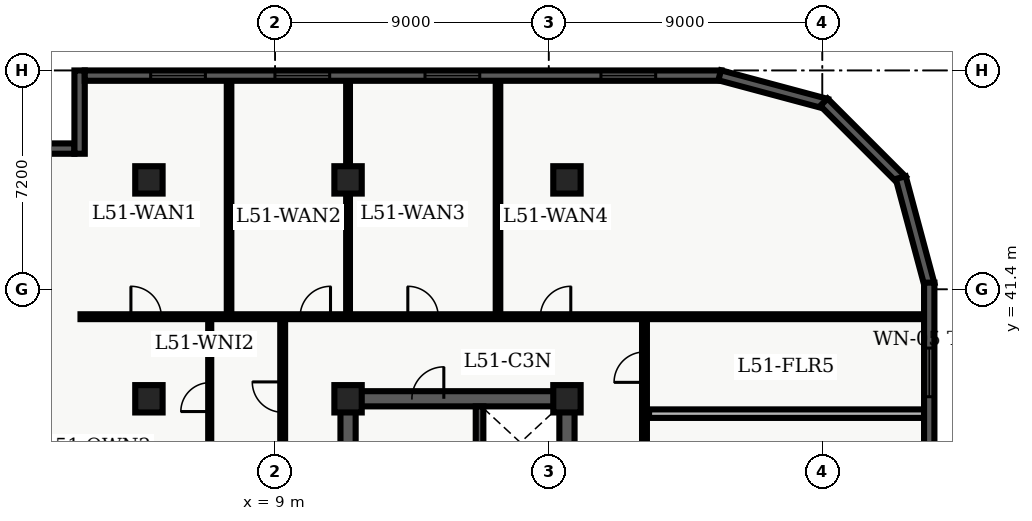
"""IFC4 building model, lengths in metres.
Left out: names, types, materials, properties, quantities, classifications, styles, units other than length and angle.
Written with IfcOpenShell. Run it as: python <this file> out.ifc"""

import sys

from ifc_helpers import new_model, entity, si_unit, converted_unit, direction, frame, origin_with_axes, origin_2d_with_axis, place, context, subcontext, project, spatial, polyline, rectangle, outline, extrude, element, fill, save


model = new_model("IFC4")
c1 = context("Model", 3, precision=1e-05, world=origin_with_axes(), true_north=direction((0.0, 1.0)))
c2 = subcontext(c1, "Body", "Model", "MODEL_VIEW")
j1 = project(units=[si_unit("LENGTHUNIT", "METRE"), converted_unit("PLANEANGLEUNIT", "DEGREE", entity("IfcPlaneAngleMeasure", 0.017), si_unit("PLANEANGLEUNIT", "RADIAN"), dimensions=[0, 0, 0, 0, 0, 0, 0])], contexts=[c1])
p1 = place(None, origin_with_axes())
s1 = spatial("IfcSite", under=j1, at=p1, CompositionType="ELEMENT")
p2 = place(p1, origin_with_axes())
s2 = spatial("IfcBuilding", under=s1, at=p2, CompositionType="ELEMENT")
p3 = place(p2, frame((0.0, 0.0, 208.2), z_axis=(0.0, 0.0, 1.0), x_axis=(1.0, 0.0, 0.0)))
s3 = spatial("IfcBuildingStorey", under=s2, at=p3, CompositionType="ELEMENT", Elevation=208.2)
p4 = place(p3, frame((11.4, 10.8, 0.0), z_axis=(0.0, 0.0, 1.0), x_axis=(0.0, 1.0, 0.0)))
e1 = element("IfcWall", 1, at=p4, inside=s3, PredefinedType="SHEAR", context=c2, shape_type="SweptSolid", body=[
    extrude(outline(polyline([(0.0, -0.25), (27.0, -0.25), (27.0, 0.25), (0.0, 0.25), (0.0, -0.25)])), origin_with_axes(), (0.0, 0.0, 1.0), 3.66),
])
p5 = place(p3, frame((11.4, 37.8, 0.0), z_axis=(0.0, 0.0, 1.0), x_axis=(1.0, 0.0, 0.0)))
e2 = element("IfcWall", 2, at=p5, inside=s3, PredefinedType="SHEAR", context=c2, shape_type="SweptSolid", body=[
    extrude(outline(polyline([(0.0, -0.25), (7.2, -0.25), (7.2, 0.25), (0.0, 0.25), (0.0, -0.25)])), origin_with_axes(), (0.0, 0.0, 1.0), 3.66),
])
p6 = place(p5, frame((2.625, 0.0, 0.0), z_axis=(0.0, 0.0, 1.0), x_axis=(1.0, 0.0, 0.0)))
e3 = element("IfcOpeningElement", 3, at=p6, cuts=e2, PredefinedType="OPENING", context=c2, shape_type="SweptSolid", body=[
    extrude(rectangle(XDim=1.05, YDim=0.52, at=origin_2d_with_axis()), origin_with_axes(), (0.0, 0.0, 1.0), 2.15),
])
p7 = place(p3, frame((18.6, 24.3, 0.0), z_axis=(0.0, 0.0, 1.0), x_axis=(0.0, 1.0, 0.0)))
e4 = element("IfcWall", 4, at=p7, inside=s3, PredefinedType="SHEAR", context=c2, shape_type="SweptSolid", body=[
    extrude(outline(polyline([(0.0, -0.25), (13.5, -0.25), (13.5, 0.25), (0.0, 0.25), (0.0, -0.25)])), origin_with_axes(), (0.0, 0.0, 1.0), 3.66),
])
p8 = place(p7, frame((5.65, 0.0, 0.0), z_axis=(0.0, 0.0, 1.0), x_axis=(1.0, 0.0, 0.0)))
e5 = element("IfcOpeningElement", 5, at=p8, cuts=e4, PredefinedType="OPENING", context=c2, shape_type="SweptSolid", body=[
    extrude(rectangle(XDim=1.1, YDim=0.52, at=origin_2d_with_axis()), origin_with_axes(), (0.0, 0.0, 1.0), 2.15),
])
p9 = place(p7, frame((7.75, 0.0, 0.0), z_axis=(0.0, 0.0, 1.0), x_axis=(1.0, 0.0, 0.0)))
e6 = element("IfcOpeningElement", 6, at=p9, cuts=e4, PredefinedType="OPENING", context=c2, shape_type="SweptSolid", body=[
    extrude(rectangle(XDim=1.1, YDim=0.52, at=origin_2d_with_axis()), origin_with_axes(), (0.0, 0.0, 1.0), 2.15),
])
p10 = place(p3, frame((15.725, 28.9, 0.0), z_axis=(0.0, 0.0, 1.0), x_axis=(0.0, 1.0, 0.0)))
e7 = element("IfcWall", 7, at=p10, inside=s3, PredefinedType="SHEAR", context=c2, shape_type="SweptSolid", body=[
    extrude(outline(polyline([(0.0, -0.125), (8.65, -0.125), (8.65, 0.125), (0.0, 0.125), (0.0, -0.125)])), origin_with_axes(), (0.0, 0.0, 1.0), 3.66),
])
for number, where, z_axis, x_axis in (
    (8, (11.4, 37.8, 0.0), (0.0, 0.0, 1.0), (1.0, 0.0, 0.0)),
    (9, (11.4, 45.0, 0.0), (0.0, 0.0, 1.0), (1.0, 0.0, 0.0)),
    (10, (18.6, 37.8, 0.0), (0.0, 0.0, 1.0), (1.0, 0.0, 0.0)),
    (11, (18.6, 45.0, 0.0), (0.0, 0.0, 1.0), (1.0, 0.0, 0.0)),
    (12, (4.85, 37.8, 0.0), (0.0, 0.0, 1.0), (1.0, 0.0, 0.0)),
    (13, (4.85, 45.0, 0.0), (0.0, 0.0, 1.0), (1.0, 0.0, 0.0)),
):
    element("IfcColumn", number, at=place(p3, frame(where, z_axis=z_axis, x_axis=x_axis)), inside=s3, PredefinedType="COLUMN", context=c2, shape_type="SweptSolid", body=[
        extrude(rectangle(XDim=0.9, YDim=0.9, at=origin_2d_with_axis()), origin_with_axes(), (0.0, 0.0, 1.0), 3.9),
    ])
p11 = place(p3, frame((2.6, 40.5, 0.0), z_axis=(0.0, 0.0, 1.0), x_axis=(1.0, 0.0, 0.0)))
e14 = element("IfcWall", 14, at=p11, inside=s3, PredefinedType="PARTITIONING", context=c2, shape_type="SweptSolid", body=[
    extrude(outline(polyline([(0.0, -0.08), (27.751, -0.08), (27.751, 0.08), (0.0, 0.08), (0.0, -0.08)])), origin_with_axes(), (0.0, 0.0, 1.0), 2.7),
])
p12 = place(p11, frame((2.158, 0.0, 0.0), z_axis=(0.0, 0.0, 1.0), x_axis=(1.0, 0.0, 0.0)))
e15 = element("IfcOpeningElement", 15, at=p12, cuts=e14, PredefinedType="OPENING", context=c2, shape_type="SweptSolid", body=[
    extrude(rectangle(XDim=1.0, YDim=0.18, at=origin_2d_with_axis()), origin_with_axes(), (0.0, 0.0, 1.0), 2.15),
])
p13 = place(p11, frame((7.723, 0.0, 0.0), z_axis=(0.0, 0.0, 1.0), x_axis=(1.0, 0.0, 0.0)))
e16 = element("IfcOpeningElement", 16, at=p13, cuts=e14, PredefinedType="OPENING", context=c2, shape_type="SweptSolid", body=[
    extrude(rectangle(XDim=1.0, YDim=0.18, at=origin_2d_with_axis()), origin_with_axes(), (0.0, 0.0, 1.0), 2.15),
])
p14 = place(p11, frame((11.266, 0.0, 0.0), z_axis=(0.0, 0.0, 1.0), x_axis=(1.0, 0.0, 0.0)))
e17 = element("IfcOpeningElement", 17, at=p14, cuts=e14, PredefinedType="OPENING", context=c2, shape_type="SweptSolid", body=[
    extrude(rectangle(XDim=1.0, YDim=0.18, at=origin_2d_with_axis()), origin_with_axes(), (0.0, 0.0, 1.0), 2.15),
])
p15 = place(p11, frame((15.626, 0.0, 0.0), z_axis=(0.0, 0.0, 1.0), x_axis=(1.0, 0.0, 0.0)))
e18 = element("IfcOpeningElement", 18, at=p15, cuts=e14, PredefinedType="OPENING", context=c2, shape_type="SweptSolid", body=[
    extrude(rectangle(XDim=1.0, YDim=0.18, at=origin_2d_with_axis()), origin_with_axes(), (0.0, 0.0, 1.0), 2.15),
])
p16 = place(p3, frame((21.15, 7.8, 0.0), z_axis=(0.0, 0.0, 1.0), x_axis=(0.0, 1.0, 0.0)))
e19 = element("IfcWall", 19, at=p16, inside=s3, PredefinedType="PARTITIONING", context=c2, shape_type="SweptSolid", body=[
    extrude(outline(polyline([(0.0, -0.08), (32.7, -0.08), (32.7, 0.08), (0.0, 0.08), (0.0, -0.08)])), origin_with_axes(), (0.0, 0.0, 1.0), 2.7),
])
p17 = place(p16, frame((15.566, 0.0, 0.0), z_axis=(0.0, 0.0, 1.0), x_axis=(1.0, 0.0, 0.0)))
e20 = element("IfcOpeningElement", 20, at=p17, cuts=e19, PredefinedType="OPENING", context=c2, shape_type="SweptSolid", body=[
    extrude(rectangle(XDim=1.0, YDim=0.18, at=origin_2d_with_axis()), origin_with_axes(), (0.0, 0.0, 1.0), 2.15),
])
p18 = place(p16, frame((19.003, 0.0, 0.0), z_axis=(0.0, 0.0, 1.0), x_axis=(1.0, 0.0, 0.0)))
e21 = element("IfcOpeningElement", 21, at=p18, cuts=e19, PredefinedType="OPENING", context=c2, shape_type="SweptSolid", body=[
    extrude(rectangle(XDim=1.0, YDim=0.18, at=origin_2d_with_axis()), origin_with_axes(), (0.0, 0.0, 1.0), 2.15),
])
p19 = place(p16, frame((22.854, 0.0, 0.0), z_axis=(0.0, 0.0, 1.0), x_axis=(1.0, 0.0, 0.0)))
e22 = element("IfcOpeningElement", 22, at=p19, cuts=e19, PredefinedType="OPENING", context=c2, shape_type="SweptSolid", body=[
    extrude(rectangle(XDim=1.0, YDim=0.18, at=origin_2d_with_axis()), origin_with_axes(), (0.0, 0.0, 1.0), 2.15),
])
p20 = place(p16, frame((27.208, 0.0, 0.0), z_axis=(0.0, 0.0, 1.0), x_axis=(1.0, 0.0, 0.0)))
e23 = element("IfcOpeningElement", 23, at=p20, cuts=e19, PredefinedType="OPENING", context=c2, shape_type="SweptSolid", body=[
    extrude(rectangle(XDim=1.0, YDim=0.18, at=origin_2d_with_axis()), origin_with_axes(), (0.0, 0.0, 1.0), 2.15),
])
p21 = place(p16, frame((31.041, 0.0, 0.0), z_axis=(0.0, 0.0, 1.0), x_axis=(1.0, 0.0, 0.0)))
e24 = element("IfcOpeningElement", 24, at=p21, cuts=e19, PredefinedType="OPENING", context=c2, shape_type="SweptSolid", body=[
    extrude(rectangle(XDim=1.0, YDim=0.18, at=origin_2d_with_axis()), origin_with_axes(), (0.0, 0.0, 1.0), 2.15),
])
p22 = place(p16, frame((5.775, 0.0, 0.0), z_axis=(0.0, 0.0, 1.0), x_axis=(1.0, 0.0, 0.0)))
e25 = element("IfcOpeningElement", 25, at=p22, cuts=e19, PredefinedType="OPENING", context=c2, shape_type="SweptSolid", body=[
    extrude(rectangle(XDim=1.05, YDim=0.18, at=origin_2d_with_axis()), origin_with_axes(), (0.0, 0.0, 1.0), 2.15),
])
p23 = place(p3, frame((9.25, 24.4, 0.0), z_axis=(0.0, 0.0, 1.0), x_axis=(0.0, 1.0, 0.0)))
e26 = element("IfcWall", 26, at=p23, inside=s3, PredefinedType="PARTITIONING", context=c2, shape_type="SweptSolid", body=[
    extrude(outline(polyline([(0.0, -0.08), (16.1, -0.08), (16.1, 0.08), (0.0, 0.08), (0.0, -0.08)])), origin_with_axes(), (0.0, 0.0, 1.0), 2.7),
])
p24 = place(p23, frame((5.51, 0.0, 0.0), z_axis=(0.0, 0.0, 1.0), x_axis=(1.0, 0.0, 0.0)))
e27 = element("IfcOpeningElement", 27, at=p24, cuts=e26, PredefinedType="OPENING", context=c2, shape_type="SweptSolid", body=[
    extrude(rectangle(XDim=1.0, YDim=0.18, at=origin_2d_with_axis()), origin_with_axes(), (0.0, 0.0, 1.0), 2.15),
])
p25 = place(p23, frame((13.455, 0.0, 0.0), z_axis=(0.0, 0.0, 1.0), x_axis=(1.0, 0.0, 0.0)))
e28 = element("IfcOpeningElement", 28, at=p25, cuts=e26, PredefinedType="OPENING", context=c2, shape_type="SweptSolid", body=[
    extrude(rectangle(XDim=1.0, YDim=0.18, at=origin_2d_with_axis()), origin_with_axes(), (0.0, 0.0, 1.0), 2.15),
])
p26 = place(p3, frame((6.85, 24.55, 0.0), z_axis=(0.0, 0.0, 1.0), x_axis=(0.0, 1.0, 0.0)))
e29 = element("IfcWall", 29, at=p26, inside=s3, PredefinedType="PARTITIONING", context=c2, shape_type="SweptSolid", body=[
    extrude(outline(polyline([(0.0, -0.05), (15.75, -0.05), (15.75, 0.05), (0.0, 0.05), (0.0, -0.05)])), origin_with_axes(), (0.0, 0.0, 1.0), 2.7),
])
p27 = place(p26, frame((5.36, 0.0, 0.0), z_axis=(0.0, 0.0, 1.0), x_axis=(1.0, 0.0, 0.0)))
e30 = element("IfcOpeningElement", 30, at=p27, cuts=e29, PredefinedType="OPENING", context=c2, shape_type="SweptSolid", body=[
    extrude(rectangle(XDim=0.95, YDim=0.12, at=origin_2d_with_axis()), origin_with_axes(), (0.0, 0.0, 1.0), 2.15),
])
p28 = place(p26, frame((13.305, 0.0, 0.0), z_axis=(0.0, 0.0, 1.0), x_axis=(1.0, 0.0, 0.0)))
e31 = element("IfcOpeningElement", 31, at=p28, cuts=e29, PredefinedType="OPENING", context=c2, shape_type="SweptSolid", body=[
    extrude(rectangle(XDim=0.95, YDim=0.12, at=origin_2d_with_axis()), origin_with_axes(), (0.0, 0.0, 1.0), 2.15),
])
p29 = place(p3, frame((7.486, 40.6, 0.0), z_axis=(0.0, 0.0, 1.0), x_axis=(0.0, 1.0, 0.0)))
e32 = element("IfcWall", 32, at=p29, inside=s3, PredefinedType="PARTITIONING", context=c2, shape_type="SweptSolid", body=[
    extrude(outline(polyline([(0.0, -0.075), (7.665, -0.075), (7.665, 0.075), (0.0, 0.075), (0.0, -0.075)])), origin_with_axes(), (0.0, 0.0, 1.0), 2.7),
])
p30 = place(p3, frame((11.4, 40.6, 0.0), z_axis=(0.0, 0.0, 1.0), x_axis=(0.0, 1.0, 0.0)))
e33 = element("IfcWall", 33, at=p30, inside=s3, PredefinedType="PARTITIONING", context=c2, shape_type="SweptSolid", body=[
    extrude(outline(polyline([(0.0, -0.062), (7.665, -0.062), (7.665, 0.062), (0.0, 0.062), (0.0, -0.062)])), origin_with_axes(), (0.0, 0.0, 1.0), 2.7),
])
p31 = place(p3, frame((16.332, 40.6, 0.0), z_axis=(0.0, 0.0, 1.0), x_axis=(0.0, 1.0, 0.0)))
e34 = element("IfcWall", 34, at=p31, inside=s3, PredefinedType="PARTITIONING", context=c2, shape_type="SweptSolid", body=[
    extrude(outline(polyline([(0.0, -0.075), (7.665, -0.075), (7.665, 0.075), (0.0, 0.075), (0.0, -0.075)])), origin_with_axes(), (0.0, 0.0, 1.0), 2.7),
])
p32 = place(p3, frame((21.3, 37.311, 0.0), z_axis=(0.0, 0.0, 1.0), x_axis=(1.0, 0.0, 0.0)))
e35 = element("IfcWall", 35, at=p32, inside=s3, PredefinedType="PARTITIONING", context=c2, shape_type="SweptSolid", body=[
    extrude(outline(polyline([(0.0, -0.14), (9.051, -0.14), (9.051, 0.14), (0.0, 0.14), (0.0, -0.14)])), origin_with_axes(), (0.0, 0.0, 1.0), 2.7),
])
p33 = place(p3, frame((0.34, 46.03, 0.0), z_axis=(0.0, 0.0, 1.0), x_axis=(1.0, 0.0, 0.0)))
e36 = element("IfcWall", 36, at=p33, inside=s3, PredefinedType="SOLIDWALL", context=c2, shape_type="SweptSolid", body=[
    extrude(outline(polyline([(0.0, -0.17), (2.06, -0.17), (2.06, 0.17), (0.0, 0.17), (0.0, -0.17)])), origin_with_axes(), (0.0, 0.0, 1.0), 3.66),
])
p34 = place(p3, frame((2.57, 45.86, 0.0), z_axis=(0.0, 0.0, 1.0), x_axis=(0.0, 1.0, 0.0)))
e37 = element("IfcWall", 37, at=p34, inside=s3, PredefinedType="SOLIDWALL", context=c2, shape_type="SweptSolid", body=[
    extrude(outline(polyline([(0.0, -0.17), (2.74, -0.17), (2.74, 0.17), (0.0, 0.17), (0.0, -0.17)])), origin_with_axes(), (0.0, 0.0, 1.0), 3.66),
])
p35 = place(p3, frame((2.74, 48.43, 0.0), z_axis=(0.0, 0.0, 1.0), x_axis=(1.0, 0.0, 0.0)))
e38 = element("IfcWall", 38, at=p35, inside=s3, PredefinedType="SOLIDWALL", context=c2, shape_type="SweptSolid", body=[
    extrude(outline(polyline([(0.0, -0.17), (20.946, -0.17), (20.946, 0.17), (0.0, 0.17), (0.0, -0.17)])), origin_with_axes(), (0.0, 0.0, 1.0), 3.66),
])
p36 = place(p35, frame((3.068, 0.0, 0.45), z_axis=(0.0, 0.0, 1.0), x_axis=(1.0, 0.0, 0.0)))
e39 = element("IfcOpeningElement", 39, at=p36, cuts=e38, PredefinedType="OPENING", context=c2, shape_type="SweptSolid", body=[
    extrude(rectangle(XDim=1.8, YDim=0.36, at=origin_2d_with_axis()), origin_with_axes(), (0.0, 0.0, 1.0), 2.1),
])
p37 = place(p35, frame((7.155, 0.0, 0.45), z_axis=(0.0, 0.0, 1.0), x_axis=(1.0, 0.0, 0.0)))
e40 = element("IfcOpeningElement", 40, at=p37, cuts=e38, PredefinedType="OPENING", context=c2, shape_type="SweptSolid", body=[
    extrude(rectangle(XDim=1.8, YDim=0.36, at=origin_2d_with_axis()), origin_with_axes(), (0.0, 0.0, 1.0), 2.1),
])
p38 = place(p35, frame((12.091, 0.0, 0.45), z_axis=(0.0, 0.0, 1.0), x_axis=(1.0, 0.0, 0.0)))
e41 = element("IfcOpeningElement", 41, at=p38, cuts=e38, PredefinedType="OPENING", context=c2, shape_type="SweptSolid", body=[
    extrude(rectangle(XDim=1.8, YDim=0.36, at=origin_2d_with_axis()), origin_with_axes(), (0.0, 0.0, 1.0), 2.1),
])
p39 = place(p35, frame((17.878, 0.0, 0.45), z_axis=(0.0, 0.0, 1.0), x_axis=(1.0, 0.0, 0.0)))
e42 = element("IfcOpeningElement", 42, at=p39, cuts=e38, PredefinedType="OPENING", context=c2, shape_type="SweptSolid", body=[
    extrude(rectangle(XDim=1.8, YDim=0.36, at=origin_2d_with_axis()), origin_with_axes(), (0.0, 0.0, 1.0), 2.1),
])
p40 = place(p3, frame((23.623, 48.441, 0.0), z_axis=(0.0, 0.0, 1.0), x_axis=(0.96592, -0.258841, 0.0)))
e43 = element("IfcWall", 43, at=p40, inside=s3, PredefinedType="SOLIDWALL", context=c2, shape_type="SweptSolid", body=[
    extrude(outline(polyline([(0.0, -0.17), (3.643, -0.17), (3.643, 0.17), (0.0, 0.17), (0.0, -0.17)])), origin_with_axes(), (0.0, 0.0, 1.0), 3.66),
])
p41 = place(p3, frame((27.052, 47.556, 0.0), z_axis=(0.0, 0.0, 1.0), x_axis=(0.707107, -0.707107, 0.0)))
e44 = element("IfcWall", 44, at=p41, inside=s3, PredefinedType="SOLIDWALL", context=c2, shape_type="SweptSolid", body=[
    extrude(outline(polyline([(0.0, -0.17), (3.643, -0.17), (3.643, 0.17), (0.0, 0.17), (0.0, -0.17)])), origin_with_axes(), (0.0, 0.0, 1.0), 3.66),
])
p42 = place(p3, frame((29.579, 45.075, 0.0), z_axis=(0.0, 0.0, 1.0), x_axis=(0.258841, -0.96592, 0.0)))
e45 = element("IfcWall", 45, at=p42, inside=s3, PredefinedType="SOLIDWALL", context=c2, shape_type="SweptSolid", body=[
    extrude(outline(polyline([(0.0, -0.17), (3.643, -0.17), (3.643, 0.17), (0.0, 0.17), (0.0, -0.17)])), origin_with_axes(), (0.0, 0.0, 1.0), 3.66),
])
p43 = place(p3, frame((30.516, 41.62, 0.0), z_axis=(0.0, 0.0, 1.0), x_axis=(0.0, -1.0, 0.0)))
e46 = element("IfcWall", 46, at=p43, inside=s3, PredefinedType="SOLIDWALL", context=c2, shape_type="SweptSolid", body=[
    extrude(outline(polyline([(0.0, -0.17), (20.02, -0.17), (20.02, 0.17), (0.0, 0.17), (0.0, -0.17)])), origin_with_axes(), (0.0, 0.0, 1.0), 3.66),
])
p44 = place(p43, frame((2.952, 0.0, 0.45), z_axis=(0.0, 0.0, 1.0), x_axis=(1.0, 0.0, 0.0)))
e47 = element("IfcOpeningElement", 47, at=p44, cuts=e46, PredefinedType="OPENING", context=c2, shape_type="SweptSolid", body=[
    extrude(rectangle(XDim=1.6, YDim=0.36, at=origin_2d_with_axis()), origin_with_axes(), (0.0, 0.0, 1.0), 2.2),
])
p45 = place(p43, frame((7.207, 0.0, 0.45), z_axis=(0.0, 0.0, 1.0), x_axis=(1.0, 0.0, 0.0)))
e48 = element("IfcOpeningElement", 48, at=p45, cuts=e46, PredefinedType="OPENING", context=c2, shape_type="SweptSolid", body=[
    extrude(rectangle(XDim=1.6, YDim=0.36, at=origin_2d_with_axis()), origin_with_axes(), (0.0, 0.0, 1.0), 2.2),
])
p46 = place(p43, frame((11.512, 0.0, 0.45), z_axis=(0.0, 0.0, 1.0), x_axis=(1.0, 0.0, 0.0)))
e49 = element("IfcOpeningElement", 49, at=p46, cuts=e46, PredefinedType="OPENING", context=c2, shape_type="SweptSolid", body=[
    extrude(rectangle(XDim=1.6, YDim=0.36, at=origin_2d_with_axis()), origin_with_axes(), (0.0, 0.0, 1.0), 2.2),
])
p47 = place(p43, frame((17.917, 0.0, 0.45), z_axis=(0.0, 0.0, 1.0), x_axis=(1.0, 0.0, 0.0)))
e50 = element("IfcOpeningElement", 50, at=p47, cuts=e46, PredefinedType="OPENING", context=c2, shape_type="SweptSolid", body=[
    extrude(rectangle(XDim=1.6, YDim=0.36, at=origin_2d_with_axis()), origin_with_axes(), (0.0, 0.0, 1.0), 2.2),
])
p48 = place(p5, frame((2.625, 0.0, 0.0), z_axis=(0.0, 0.0, 1.0), x_axis=(1.0, 0.0, 0.0)))
e51 = element("IfcDoor", 51, at=p48, inside=s3, OperationType="SINGLE_SWING_RIGHT", PredefinedType="DOOR", context=c2, shape_type="SweptSolid", body=[
    extrude(rectangle(XDim=1.05, YDim=0.09, at=origin_2d_with_axis()), origin_with_axes(), (0.0, 0.0, 1.0), 2.15),
])
fill(e3, e51)
p49 = place(p26, frame((13.305, 0.0, 0.0), z_axis=(0.0, 0.0, 1.0), x_axis=(1.0, 0.0, 0.0)))
e52 = element("IfcDoor", 52, at=p49, inside=s3, OperationType="SINGLE_SWING_LEFT", PredefinedType="DOOR", context=c2, shape_type="SweptSolid", body=[
    extrude(rectangle(XDim=0.95, YDim=0.06, at=origin_2d_with_axis()), origin_with_axes(), (0.0, 0.0, 1.0), 2.15),
])
fill(e31, e52)
p50 = place(p23, frame((13.455, 0.0, 0.0), z_axis=(0.0, 0.0, 1.0), x_axis=(1.0, 0.0, 0.0)))
e53 = element("IfcDoor", 53, at=p50, inside=s3, OperationType="SINGLE_SWING_RIGHT", PredefinedType="DOOR", context=c2, shape_type="SweptSolid", body=[
    extrude(rectangle(XDim=1.0, YDim=0.09, at=origin_2d_with_axis()), origin_with_axes(), (0.0, 0.0, 1.0), 2.15),
])
fill(e28, e53)
p51 = place(p11, frame((2.158, 0.0, 0.0), z_axis=(0.0, 0.0, 1.0), x_axis=(1.0, 0.0, 0.0)))
e54 = element("IfcDoor", 54, at=p51, inside=s3, OperationType="SINGLE_SWING_LEFT", PredefinedType="DOOR", context=c2, shape_type="SweptSolid", body=[
    extrude(rectangle(XDim=1.0, YDim=0.09, at=origin_2d_with_axis()), origin_with_axes(), (0.0, 0.0, 1.0), 2.15),
])
fill(e15, e54)
p52 = place(p11, frame((7.723, 0.0, 0.0), z_axis=(0.0, 0.0, 1.0), x_axis=(1.0, 0.0, 0.0)))
e55 = element("IfcDoor", 55, at=p52, inside=s3, OperationType="SINGLE_SWING_RIGHT", PredefinedType="DOOR", context=c2, shape_type="SweptSolid", body=[
    extrude(rectangle(XDim=1.0, YDim=0.09, at=origin_2d_with_axis()), origin_with_axes(), (0.0, 0.0, 1.0), 2.15),
])
fill(e16, e55)
p53 = place(p11, frame((11.266, 0.0, 0.0), z_axis=(0.0, 0.0, 1.0), x_axis=(1.0, 0.0, 0.0)))
e56 = element("IfcDoor", 56, at=p53, inside=s3, OperationType="SINGLE_SWING_LEFT", PredefinedType="DOOR", context=c2, shape_type="SweptSolid", body=[
    extrude(rectangle(XDim=1.0, YDim=0.09, at=origin_2d_with_axis()), origin_with_axes(), (0.0, 0.0, 1.0), 2.15),
])
fill(e17, e56)
p54 = place(p11, frame((15.626, 0.0, 0.0), z_axis=(0.0, 0.0, 1.0), x_axis=(1.0, 0.0, 0.0)))
e57 = element("IfcDoor", 57, at=p54, inside=s3, OperationType="SINGLE_SWING_RIGHT", PredefinedType="DOOR", context=c2, shape_type="SweptSolid", body=[
    extrude(rectangle(XDim=1.0, YDim=0.09, at=origin_2d_with_axis()), origin_with_axes(), (0.0, 0.0, 1.0), 2.15),
])
fill(e18, e57)
p55 = place(p16, frame((31.041, 0.0, 0.0), z_axis=(0.0, 0.0, 1.0), x_axis=(1.0, 0.0, 0.0)))
e58 = element("IfcDoor", 58, at=p55, inside=s3, OperationType="SINGLE_SWING_LEFT", PredefinedType="DOOR", context=c2, shape_type="SweptSolid", body=[
    extrude(rectangle(XDim=1.0, YDim=0.09, at=origin_2d_with_axis()), origin_with_axes(), (0.0, 0.0, 1.0), 2.15),
])
fill(e24, e58)
p56 = place(p35, frame((3.068, 0.0, 0.45), z_axis=(0.0, 0.0, 1.0), x_axis=(1.0, 0.0, 0.0)))
e59 = element("IfcWindow", 59, at=p56, inside=s3, PredefinedType="WINDOW", context=c2, shape_type="SweptSolid", body=[
    extrude(rectangle(XDim=1.8, YDim=0.09, at=origin_2d_with_axis()), origin_with_axes(), (0.0, 0.0, 1.0), 2.1),
])
fill(e39, e59)
p57 = place(p35, frame((7.155, 0.0, 0.45), z_axis=(0.0, 0.0, 1.0), x_axis=(1.0, 0.0, 0.0)))
e60 = element("IfcWindow", 60, at=p57, inside=s3, PredefinedType="WINDOW", context=c2, shape_type="SweptSolid", body=[
    extrude(rectangle(XDim=1.8, YDim=0.09, at=origin_2d_with_axis()), origin_with_axes(), (0.0, 0.0, 1.0), 2.1),
])
fill(e40, e60)
p58 = place(p35, frame((12.091, 0.0, 0.45), z_axis=(0.0, 0.0, 1.0), x_axis=(1.0, 0.0, 0.0)))
e61 = element("IfcWindow", 61, at=p58, inside=s3, PredefinedType="WINDOW", context=c2, shape_type="SweptSolid", body=[
    extrude(rectangle(XDim=1.8, YDim=0.09, at=origin_2d_with_axis()), origin_with_axes(), (0.0, 0.0, 1.0), 2.1),
])
fill(e41, e61)
p59 = place(p35, frame((17.878, 0.0, 0.45), z_axis=(0.0, 0.0, 1.0), x_axis=(1.0, 0.0, 0.0)))
e62 = element("IfcWindow", 62, at=p59, inside=s3, PredefinedType="WINDOW", context=c2, shape_type="SweptSolid", body=[
    extrude(rectangle(XDim=1.8, YDim=0.09, at=origin_2d_with_axis()), origin_with_axes(), (0.0, 0.0, 1.0), 2.1),
])
fill(e42, e62)
p60 = place(p43, frame((2.952, 0.0, 0.45), z_axis=(0.0, 0.0, 1.0), x_axis=(1.0, 0.0, 0.0)))
e63 = element("IfcWindow", 63, at=p60, inside=s3, PredefinedType="WINDOW", context=c2, shape_type="SweptSolid", body=[
    extrude(rectangle(XDim=1.6, YDim=0.09, at=origin_2d_with_axis()), origin_with_axes(), (0.0, 0.0, 1.0), 2.2),
])
fill(e47, e63)
save(model, sys.argv[1])
